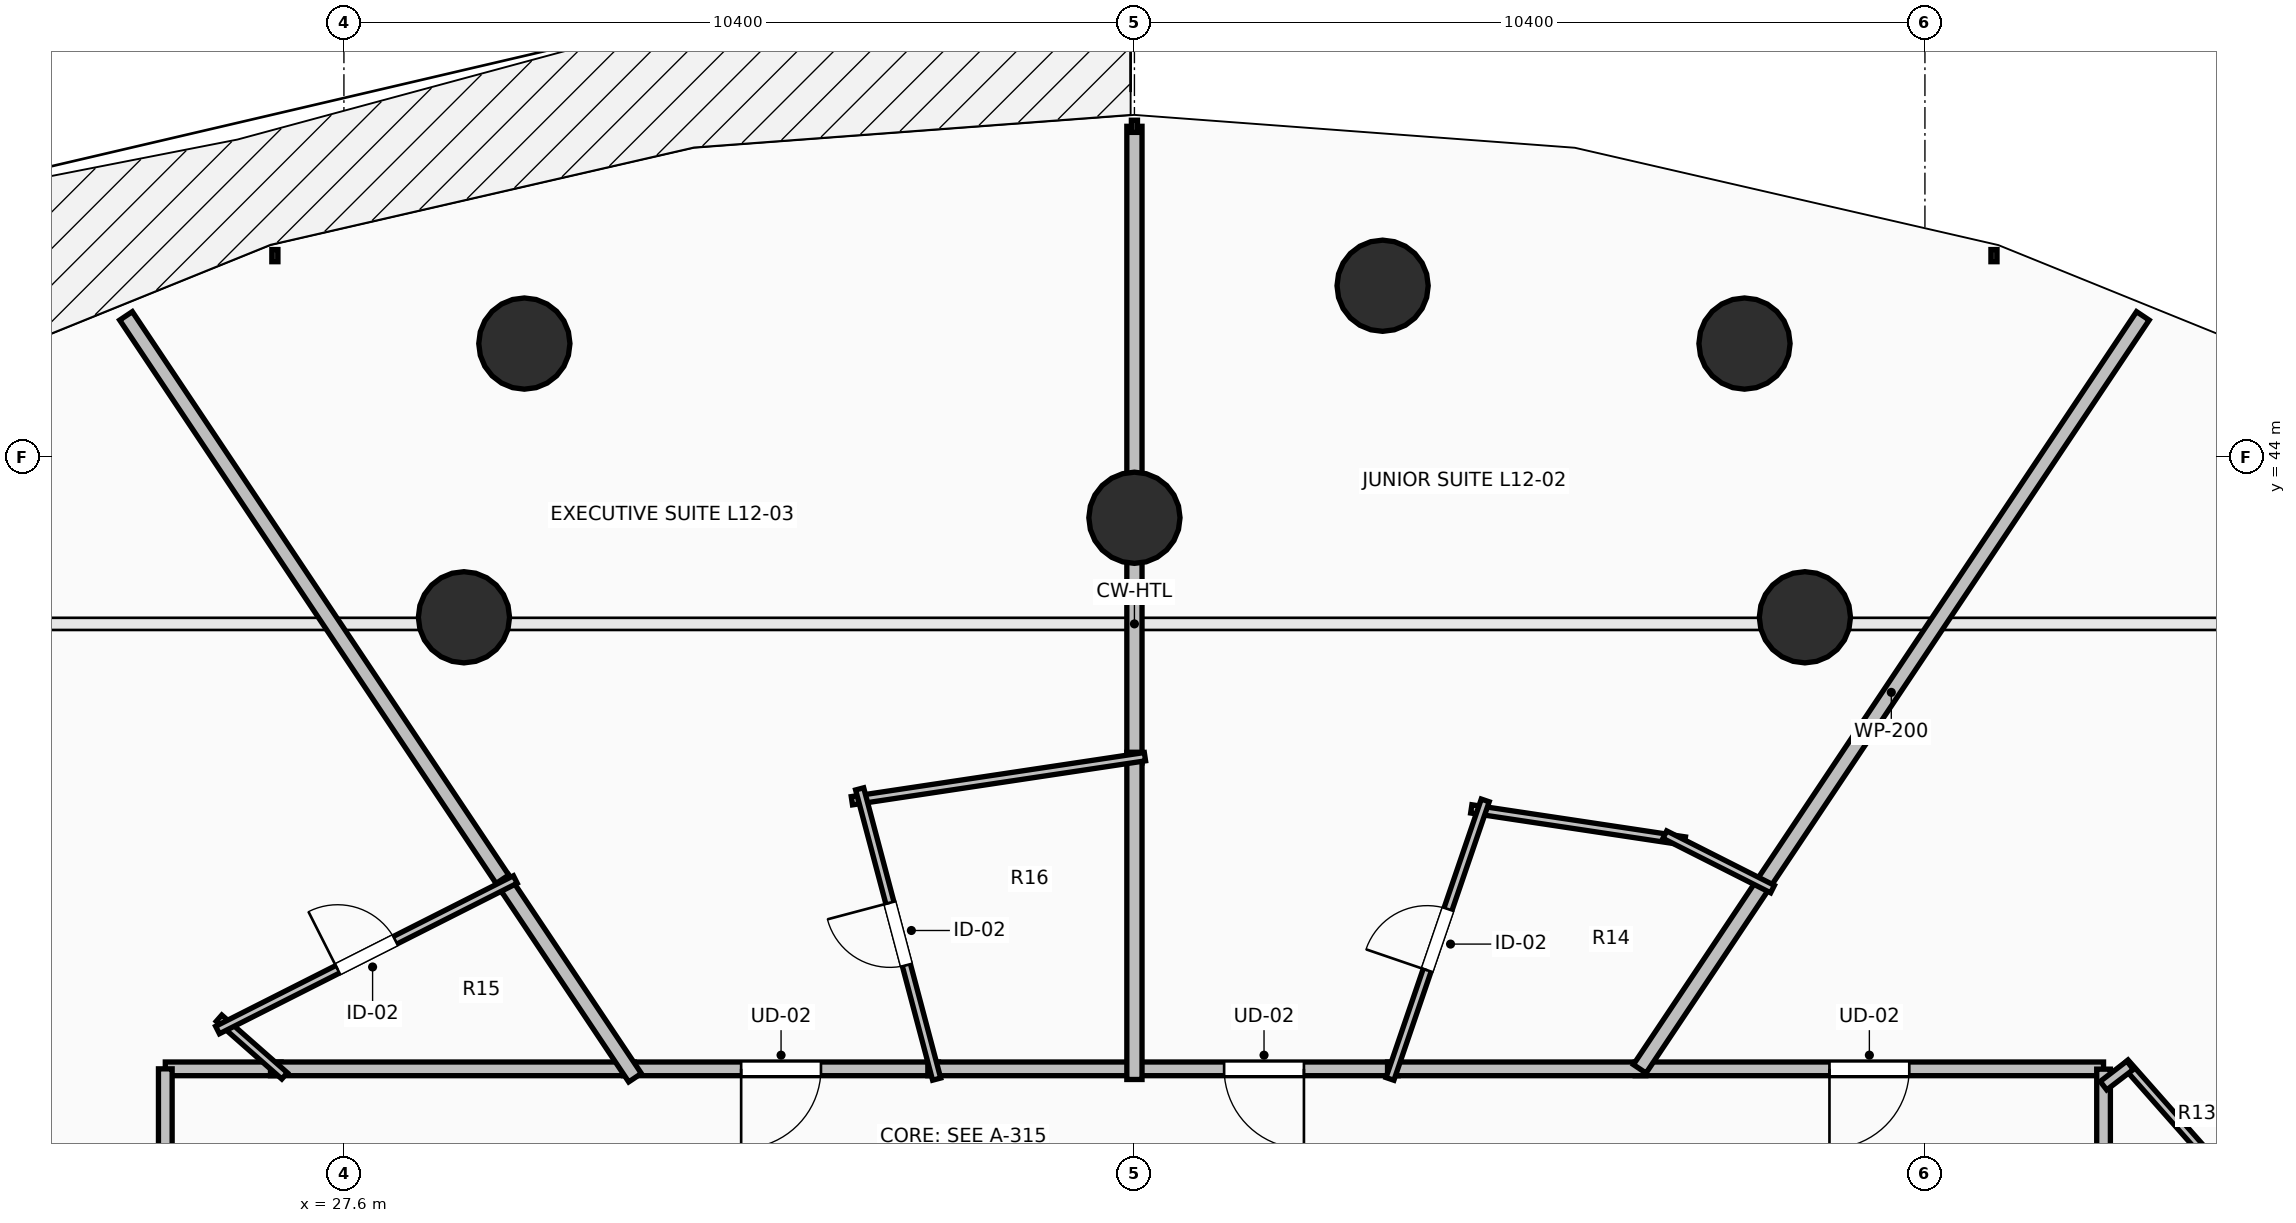
"""IFC4 building model, lengths in metres.
Left out: names, types, materials, properties, quantities, classifications, styles, units other than length and angle.
Written with IfcOpenShell. Run it as: python <this file> out.ifc"""

import sys

from ifc_helpers import new_model, si_unit, direction, frame, frame_2d, origin, origin_2d, place, context, subcontext, project, spatial, rectangle, circle, extrude, element, fill, save


model = new_model("IFC4")
c1 = context("Model", 3, precision=1e-05, world=origin(), true_north=direction((0.0, 1.0)))
c2 = subcontext(c1, "Body", "Model", "MODEL_VIEW")
j1 = project(units=[si_unit("LENGTHUNIT", "METRE"), si_unit("PLANEANGLEUNIT", "RADIAN")], contexts=[c1])
p1 = place(None, origin())
s1 = spatial("IfcSite", under=j1, at=p1, CompositionType="ELEMENT")
p2 = place(p1, origin())
s2 = spatial("IfcBuilding", under=s1, at=p2, CompositionType="ELEMENT")
p3 = place(p2, frame((0.0, 0.0, 48.5)))
s3 = spatial("IfcBuildingStorey", under=s2, at=p3, CompositionType="ELEMENT", Elevation=48.5)
for number, where, z_axis, x_axis in (
    (1, (46.821, 41.891, 0.0), (0.0, 0.0, 1.0), (0.383, 0.924, 0.0)),
    (2, (38.0, 43.2, 0.0), (0.0, 0.0, 1.0), (0.0, 1.0, 0.0)),
    (3, (29.179, 41.891, 0.0), (0.0, 0.0, 1.0), (-0.383, 0.924, 0.0)),
    (4, (46.026, 45.492, 0.0), (0.0, 0.0, 1.0), (0.383, 0.924, 0.0)),
    (5, (41.265, 46.252, 0.0), (0.0, 0.0, 1.0), (0.0, 1.0, 0.0)),
    (6, (29.974, 45.492, 0.0), (0.0, 0.0, 1.0), (-0.383, 0.924, 0.0)),
):
    element("IfcColumn", number, at=place(p3, frame(where, z_axis=z_axis, x_axis=x_axis)), inside=s3, PredefinedType="COLUMN", context=c2, shape_type="SweptSolid", body=[
        extrude(circle(Radius=0.6, at=origin_2d()), origin(), (0.0, 0.0, 1.0), 3.5),
    ])
p4 = place(p3, frame((50.75, 35.95, 0.0), z_axis=(0.0, 0.0, 1.0), x_axis=(-1.0, 0.0, 0.0)))
e7 = element("IfcWall", 7, at=p4, inside=s3, PredefinedType="PARTITIONING", context=c2, shape_type="SweptSolid", body=[
    extrude(rectangle(XDim=6.162, YDim=0.18, at=frame_2d((3.081, 0.0))), origin(), (0.0, 0.0, 1.0), 2.432),
])
p5 = place(p4, frame((2.556, 0.0, 0.0)))
e8 = element("IfcOpeningElement", 8, at=p5, cuts=e7, PredefinedType="OPENING", context=c2, shape_type="SweptSolid", body=[
    extrude(rectangle(XDim=1.05, YDim=2.2, at=frame_2d((0.525, 1.1))), frame((0.0, 0.105, 0.0), z_axis=(0.0, -1.0, 0.0), x_axis=(1.0, 0.0, 0.0)), (0.0, 0.0, 1.0), 0.21),
])
p6 = place(p3, frame((50.75, 31.081, 0.0), z_axis=(0.0, 0.0, 1.0), x_axis=(0.0, 1.0, 0.0)))
e9 = element("IfcWall", 9, at=p6, inside=s3, PredefinedType="PARTITIONING", context=c2, shape_type="SweptSolid", body=[
    extrude(rectangle(XDim=4.865, YDim=0.18, at=frame_2d((2.433, 0.0))), origin(), (0.0, 0.0, 1.0), 2.432),
])
p7 = place(p3, frame((41.47, 35.95, 0.0), z_axis=(0.0, 0.0, 1.0), x_axis=(-1.0, 0.0, 0.0)))
e10 = element("IfcWall", 10, at=p7, inside=s3, PredefinedType="PARTITIONING", context=c2, shape_type="SweptSolid", body=[
    extrude(rectangle(XDim=3.53, YDim=0.18, at=frame_2d((1.765, 0.0))), origin(), (0.0, 0.0, 1.0), 3.24),
])
p8 = place(p7, frame((1.24, 0.0, 0.0)))
e11 = element("IfcOpeningElement", 11, at=p8, cuts=e10, PredefinedType="OPENING", context=c2, shape_type="SweptSolid", body=[
    extrude(rectangle(XDim=1.05, YDim=2.2, at=frame_2d((0.525, 1.1))), frame((0.0, 0.105, 0.0), z_axis=(0.0, -1.0, 0.0), x_axis=(1.0, 0.0, 0.0)), (0.0, 0.0, 1.0), 0.21),
])
p9 = place(p3, frame((44.728, 35.95, 0.0), z_axis=(0.0, 0.0, 1.0), x_axis=(-1.0, 0.0, 0.0)))
e12 = element("IfcWall", 12, at=p9, inside=s3, PredefinedType="PARTITIONING", context=c2, shape_type="SweptSolid", body=[
    extrude(rectangle(XDim=3.398, YDim=0.18, at=frame_2d((1.699, 0.0))), origin(), (0.0, 0.0, 1.0), 3.24),
])
p10 = place(p3, frame((35.422, 35.95, 0.0), z_axis=(0.0, 0.0, 1.0), x_axis=(-1.0, 0.0, 0.0)))
e13 = element("IfcWall", 13, at=p10, inside=s3, PredefinedType="PARTITIONING", context=c2, shape_type="SweptSolid", body=[
    extrude(rectangle(XDim=4.142, YDim=0.18, at=frame_2d((2.071, 0.0))), origin(), (0.0, 0.0, 1.0), 3.24),
])
p11 = place(p10, frame((1.546, 0.0, 0.0)))
e14 = element("IfcOpeningElement", 14, at=p11, cuts=e13, PredefinedType="OPENING", context=c2, shape_type="SweptSolid", body=[
    extrude(rectangle(XDim=1.05, YDim=2.2, at=frame_2d((0.525, 1.1))), frame((0.0, 0.105, 0.0), z_axis=(0.0, -1.0, 0.0), x_axis=(1.0, 0.0, 0.0)), (0.0, 0.0, 1.0), 0.21),
])
p12 = place(p3, frame((38.08, 35.95, 0.0), z_axis=(0.0, 0.0, 1.0), x_axis=(-1.0, 0.0, 0.0)))
e15 = element("IfcWall", 15, at=p12, inside=s3, PredefinedType="PARTITIONING", context=c2, shape_type="SweptSolid", body=[
    extrude(rectangle(XDim=2.798, YDim=0.18, at=frame_2d((1.399, 0.0))), origin(), (0.0, 0.0, 1.0), 3.24),
])
p13 = place(p3, frame((26.774, 35.95, 0.0), z_axis=(0.0, 0.0, 1.0), x_axis=(-1.0, 0.0, 0.0)))
e16 = element("IfcWall", 16, at=p13, inside=s3, PredefinedType="PARTITIONING", context=c2, shape_type="SweptSolid", body=[
    extrude(rectangle(XDim=1.524, YDim=0.18, at=frame_2d((0.762, 0.0))), origin(), (0.0, 0.0, 1.0), 2.886),
])
p14 = place(p3, frame((25.25, 35.95, 0.0), z_axis=(0.0, 0.0, 1.0), x_axis=(0.0, -1.0, 0.0)))
e17 = element("IfcWall", 17, at=p14, inside=s3, PredefinedType="PARTITIONING", context=c2, shape_type="SweptSolid", body=[
    extrude(rectangle(XDim=4.729, YDim=0.18, at=frame_2d((2.365, 0.0))), origin(), (0.0, 0.0, 1.0), 2.432),
])
p15 = place(p14, frame((1.84, 0.0, 0.0)))
e18 = element("IfcOpeningElement", 18, at=p15, cuts=e17, PredefinedType="OPENING", context=c2, shape_type="SweptSolid", body=[
    extrude(rectangle(XDim=1.05, YDim=2.2, at=frame_2d((0.525, 1.1))), frame((0.0, 0.105, 0.0), z_axis=(0.0, -1.0, 0.0), x_axis=(1.0, 0.0, 0.0)), (0.0, 0.0, 1.0), 0.21),
])
p16 = place(p3, frame((31.42, 35.95, 0.0), z_axis=(0.0, 0.0, 1.0), x_axis=(-1.0, 0.0, 0.0)))
e19 = element("IfcWall", 19, at=p16, inside=s3, PredefinedType="PARTITIONING", context=c2, shape_type="SweptSolid", body=[
    extrude(rectangle(XDim=4.786, YDim=0.18, at=frame_2d((2.393, 0.0))), origin(), (0.0, 0.0, 1.0), 2.432),
])
p17 = place(p3, frame((51.031, 36.03, 0.0), z_axis=(0.0, 0.0, 1.0), x_axis=(0.662106207726, -0.749410014405, 0.0)))
e20 = element("IfcWall", 20, at=p17, inside=s3, PredefinedType="PARTITIONING", context=c2, shape_type="SweptSolid", body=[
    extrude(rectangle(XDim=4.665, YDim=0.11, at=frame_2d((2.332, 0.0))), origin(), (0.0, 0.0, 1.0), 2.432),
])
p18 = place(p17, frame((1.907, 0.0, 0.0)))
e21 = element("IfcOpeningElement", 21, at=p18, cuts=e20, PredefinedType="OPENING", context=c2, shape_type="SweptSolid", body=[
    extrude(rectangle(XDim=0.85, YDim=2.1, at=frame_2d((0.425, 1.05))), frame((0.0, 0.07, 0.0), z_axis=(0.0, -1.0, 0.0), x_axis=(1.0, 0.0, 0.0)), (0.0, 0.0, 1.0), 0.14),
])
p19 = place(p3, frame((51.267, 45.856, 0.0), z_axis=(0.0, 0.0, 1.0), x_axis=(-0.55557946655, -0.831463442581, 0.0)))
e22 = element("IfcWall", 22, at=p19, inside=s3, PredefinedType="PARTITIONING", context=c2, shape_type="SweptSolid", body=[
    extrude(rectangle(XDim=11.914, YDim=0.2, at=frame_2d((5.957, 0.0))), origin(), (0.0, 0.0, 1.0), 2.432),
])
p20 = place(p3, frame((42.432, 39.37, 0.0), z_axis=(0.0, 0.0, 1.0), x_axis=(0.988877663763, -0.148731187416, 0.0)))
e23 = element("IfcWall", 23, at=p20, inside=s3, PredefinedType="PARTITIONING", context=c2, shape_type="SweptSolid", body=[
    extrude(rectangle(XDim=2.841, YDim=0.11, at=frame_2d((1.421, 0.0))), origin(), (0.0, 0.0, 1.0), 3.24),
])
p21 = place(p3, frame((44.978, 39.031, 0.0), z_axis=(0.0, 0.0, 1.0), x_axis=(0.892388427115, -0.451268096758, 0.0)))
e24 = element("IfcWall", 24, at=p21, inside=s3, PredefinedType="PARTITIONING", context=c2, shape_type="SweptSolid", body=[
    extrude(rectangle(XDim=1.588, YDim=0.11, at=frame_2d((0.794, 0.0))), origin(), (0.0, 0.0, 1.0), 3.24),
])
p22 = place(p3, frame((41.362, 35.817, 0.0), z_axis=(0.0, 0.0, 1.0), x_axis=(0.323669856167, 0.946170082072, 0.0)))
e25 = element("IfcWall", 25, at=p22, inside=s3, PredefinedType="PARTITIONING", context=c2, shape_type="SweptSolid", body=[
    extrude(rectangle(XDim=3.873, YDim=0.11, at=frame_2d((1.936, 0.0))), origin(), (0.0, 0.0, 1.0), 2.886),
])
p23 = place(p22, frame((1.511, 0.0, 0.0)))
e26 = element("IfcOpeningElement", 26, at=p23, cuts=e25, PredefinedType="OPENING", context=c2, shape_type="SweptSolid", body=[
    extrude(rectangle(XDim=0.85, YDim=2.1, at=frame_2d((0.425, 1.05))), frame((0.0, 0.07, 0.0), z_axis=(0.0, -1.0, 0.0), x_axis=(1.0, 0.0, 0.0)), (0.0, 0.0, 1.0), 0.14),
])
p24 = place(p3, frame((38.0, 48.35, 0.0), z_axis=(0.0, 0.0, 1.0), x_axis=(0.0, -1.0, 0.0)))
e27 = element("IfcWall", 27, at=p24, inside=s3, PredefinedType="PARTITIONING", context=c2, shape_type="SweptSolid", body=[
    extrude(rectangle(XDim=8.375, YDim=0.2, at=frame_2d((4.188, 0.0))), origin(), (0.0, 0.0, 1.0), 2.432),
])
p25 = place(p3, frame((38.0, 40.115, 0.0), z_axis=(0.0, 0.0, 1.0), x_axis=(0.0, -1.0, 0.0)))
e28 = element("IfcWall", 28, at=p25, inside=s3, PredefinedType="PARTITIONING", context=c2, shape_type="SweptSolid", body=[
    extrude(rectangle(XDim=4.305, YDim=0.2, at=frame_2d((2.152, 0.0))), origin(), (0.0, 0.0, 1.0), 2.886),
])
p26 = place(p3, frame((34.283, 39.477, 0.0), z_axis=(0.0, 0.0, 1.0), x_axis=(0.988889916837, 0.148649696864, 0.0)))
e29 = element("IfcWall", 29, at=p26, inside=s3, PredefinedType="PARTITIONING", context=c2, shape_type="SweptSolid", body=[
    extrude(rectangle(XDim=3.899, YDim=0.11, at=frame_2d((1.949, 0.0))), origin(), (0.0, 0.0, 1.0), 2.432),
])
p27 = place(p3, frame((35.398, 35.815, 0.0), z_axis=(0.0, 0.0, 1.0), x_axis=(-0.256396995263, 0.966571560113, 0.0)))
e30 = element("IfcWall", 30, at=p27, inside=s3, PredefinedType="PARTITIONING", context=c2, shape_type="SweptSolid", body=[
    extrude(rectangle(XDim=3.951, YDim=0.11, at=frame_2d((1.975, 0.0))), origin(), (0.0, 0.0, 1.0), 2.432),
])
p28 = place(p27, frame((1.55, 0.0, 0.0)))
e31 = element("IfcOpeningElement", 31, at=p28, cuts=e30, PredefinedType="OPENING", context=c2, shape_type="SweptSolid", body=[
    extrude(rectangle(XDim=0.85, YDim=2.1, at=frame_2d((0.425, 1.05))), frame((0.0, 0.07, 0.0), z_axis=(0.0, -1.0, 0.0), x_axis=(1.0, 0.0, 0.0)), (0.0, 0.0, 1.0), 0.14),
])
p29 = place(p3, frame((24.733, 45.856, 0.0), z_axis=(0.0, 0.0, 1.0), x_axis=(0.555564858458, -0.831473203444, 0.0)))
e32 = element("IfcWall", 32, at=p29, inside=s3, PredefinedType="PARTITIONING", context=c2, shape_type="SweptSolid", body=[
    extrude(rectangle(XDim=9.054, YDim=0.2, at=frame_2d((4.527, 0.0))), origin(), (0.0, 0.0, 1.0), 2.432),
])
p30 = place(p3, frame((29.685, 38.444, 0.0), z_axis=(0.0, 0.0, 1.0), x_axis=(0.555596981897, -0.831451738652, 0.0)))
e33 = element("IfcWall", 33, at=p30, inside=s3, PredefinedType="PARTITIONING", context=c2, shape_type="SweptSolid", body=[
    extrude(rectangle(XDim=3.14, YDim=0.2, at=frame_2d((1.57, 0.0))), origin(), (0.0, 0.0, 1.0), 2.432),
])
p31 = place(p3, frame((26.819, 35.857, 0.0), z_axis=(0.0, 0.0, 1.0), x_axis=(-0.750624975639, 0.660728496394, 0.0)))
e34 = element("IfcWall", 34, at=p31, inside=s3, PredefinedType="PARTITIONING", context=c2, shape_type="SweptSolid", body=[
    extrude(rectangle(XDim=1.149, YDim=0.11, at=frame_2d((0.574, 0.0))), origin(), (0.0, 0.0, 1.0), 2.886),
])
p32 = place(p3, frame((25.937, 36.461, 0.0), z_axis=(0.0, 0.0, 1.0), x_axis=(0.892461080662, 0.451124394711, 0.0)))
e35 = element("IfcWall", 35, at=p32, inside=s3, PredefinedType="PARTITIONING", context=c2, shape_type="SweptSolid", body=[
    extrude(rectangle(XDim=4.39, YDim=0.11, at=frame_2d((2.195, 0.0))), origin(), (0.0, 0.0, 1.0), 2.432),
])
p33 = place(p32, frame((1.77, 0.0, 0.0)))
e36 = element("IfcOpeningElement", 36, at=p33, cuts=e35, PredefinedType="OPENING", context=c2, shape_type="SweptSolid", body=[
    extrude(rectangle(XDim=0.85, YDim=2.1, at=frame_2d((0.425, 1.05))), frame((0.0, 0.07, 0.0), z_axis=(0.0, -1.0, 0.0), x_axis=(1.0, 0.0, 0.0)), (0.0, 0.0, 1.0), 0.14),
])
p34 = place(p3, frame((51.099, 35.997, 0.0), z_axis=(0.0, 0.0, 1.0), x_axis=(-0.794185002189, -0.607676050456, 0.0)))
e37 = element("IfcWall", 37, at=p34, inside=s3, PredefinedType="PARTITIONING", context=c2, shape_type="SweptSolid", body=[
    extrude(rectangle(XDim=0.441, YDim=0.14, at=frame_2d((0.221, 0.0))), origin(), (0.0, 0.0, 1.0), 2.886),
])
p35 = place(p5, origin())
e38 = element("IfcDoor", 38, at=p35, inside=s3, OperationType="SINGLE_SWING_RIGHT", PredefinedType="DOOR", context=c2, shape_type="SweptSolid", body=[
    extrude(rectangle(XDim=1.05, YDim=2.2, at=frame_2d((0.525, 1.1))), frame((0.0, 0.025, 0.0), z_axis=(0.0, -1.0, 0.0), x_axis=(1.0, 0.0, 0.0)), (0.0, 0.0, 1.0), 0.05),
])
fill(e8, e38)
p36 = place(p8, origin())
e39 = element("IfcDoor", 39, at=p36, inside=s3, OperationType="SINGLE_SWING_LEFT", PredefinedType="DOOR", context=c2, shape_type="SweptSolid", body=[
    extrude(rectangle(XDim=1.05, YDim=2.2, at=frame_2d((0.525, 1.1))), frame((0.0, 0.025, 0.0), z_axis=(0.0, -1.0, 0.0), x_axis=(1.0, 0.0, 0.0)), (0.0, 0.0, 1.0), 0.05),
])
fill(e11, e39)
p37 = place(p11, origin())
e40 = element("IfcDoor", 40, at=p37, inside=s3, OperationType="SINGLE_SWING_RIGHT", PredefinedType="DOOR", context=c2, shape_type="SweptSolid", body=[
    extrude(rectangle(XDim=1.05, YDim=2.2, at=frame_2d((0.525, 1.1))), frame((0.0, 0.025, 0.0), z_axis=(0.0, -1.0, 0.0), x_axis=(1.0, 0.0, 0.0)), (0.0, 0.0, 1.0), 0.05),
])
fill(e14, e40)
p38 = place(p23, origin())
e41 = element("IfcDoor", 41, at=p38, inside=s3, OperationType="SINGLE_SWING_LEFT", PredefinedType="DOOR", context=c2, shape_type="SweptSolid", body=[
    extrude(rectangle(XDim=0.85, YDim=2.1, at=frame_2d((0.425, 1.05))), frame((0.0, 0.025, 0.0), z_axis=(0.0, -1.0, 0.0), x_axis=(1.0, 0.0, 0.0)), (0.0, 0.0, 1.0), 0.05),
])
fill(e26, e41)
p39 = place(p28, origin())
e42 = element("IfcDoor", 42, at=p39, inside=s3, OperationType="SINGLE_SWING_RIGHT", PredefinedType="DOOR", context=c2, shape_type="SweptSolid", body=[
    extrude(rectangle(XDim=0.85, YDim=2.1, at=frame_2d((0.425, 1.05))), frame((0.0, 0.025, 0.0), z_axis=(0.0, -1.0, 0.0), x_axis=(1.0, 0.0, 0.0)), (0.0, 0.0, 1.0), 0.05),
])
fill(e31, e42)
p40 = place(p33, origin())
e43 = element("IfcDoor", 43, at=p40, inside=s3, OperationType="SINGLE_SWING_LEFT", PredefinedType="DOOR", context=c2, shape_type="SweptSolid", body=[
    extrude(rectangle(XDim=0.85, YDim=2.1, at=frame_2d((0.425, 1.05))), frame((0.0, 0.025, 0.0), z_axis=(0.0, -1.0, 0.0), x_axis=(1.0, 0.0, 0.0)), (0.0, 0.0, 1.0), 0.05),
])
fill(e36, e43)
save(model, sys.argv[1])
